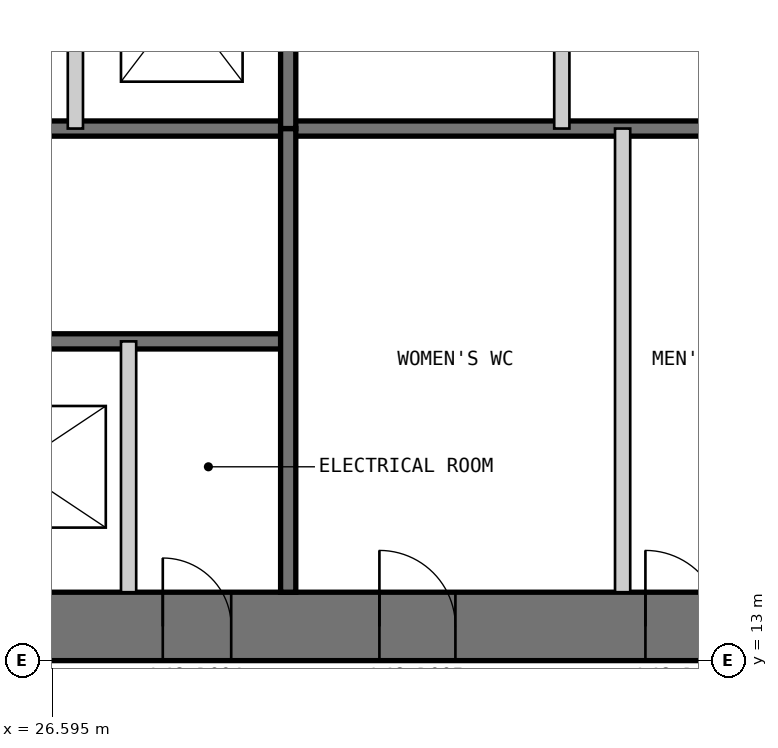
"""IFC4 building model, lengths in metres.
Left out: names, types, materials, properties, quantities, classifications, styles, units other than length and angle.
Written with IfcOpenShell. Run it as: python <this file> out.ifc"""

import sys

from ifc_helpers import new_model, si_unit, direction, frame, frame_2d, origin, place, context, subcontext, project, spatial, polyline, rectangle, outline, extrude, element, fill, save


model = new_model("IFC4")
c1 = context("Model", 3, precision=1e-05, world=origin(), true_north=direction((0.0, 1.0)))
c2 = subcontext(c1, "Body", "Model", "MODEL_VIEW")
j1 = project(units=[si_unit("LENGTHUNIT", "METRE"), si_unit("PLANEANGLEUNIT", "RADIAN")], contexts=[c1])
p1 = place(None, origin())
s1 = spatial("IfcSite", under=j1, at=p1, CompositionType="ELEMENT")
p2 = place(p1, origin())
s2 = spatial("IfcBuilding", under=s1, at=p2, CompositionType="ELEMENT")
p3 = place(p2, frame((0.0, 0.0, 205.8)))
s3 = spatial("IfcBuildingStorey", under=s2, at=p3, CompositionType="ELEMENT", Elevation=205.8)
p4 = place(p3, frame((13.0, 13.45, 0.0), z_axis=(0.0, 0.0, 1.0), x_axis=(1.0, 0.0, 0.0)))
e1 = element("IfcWall", 1, at=p4, inside=s3, PredefinedType="SHEAR", context=c2, shape_type="SweptSolid", body=[
    extrude(outline(polyline([(0.0, -0.45), (24.0, -0.45), (23.1, 0.45), (0.9, 0.45), (0.0, -0.45)])), origin(), (0.0, 0.0, 1.0), 4.0),
])
p5 = place(p4, frame((4.9, 0.0, 0.0)))
e2 = element("IfcOpeningElement", 2, at=p5, cuts=e1, PredefinedType="OPENING", context=c2, shape_type="SweptSolid", body=[
    extrude(rectangle(XDim=1.0, YDim=2.2, at=frame_2d((0.5, 1.1))), frame((0.0, 0.46, 0.0), z_axis=(0.0, -1.0, 0.0), x_axis=(1.0, 0.0, 0.0)), (0.0, 0.0, 1.0), 0.92),
])
p6 = place(p4, frame((8.9, 0.0, 0.0)))
e3 = element("IfcOpeningElement", 3, at=p6, cuts=e1, PredefinedType="OPENING", context=c2, shape_type="SweptSolid", body=[
    extrude(rectangle(XDim=1.1, YDim=2.2, at=frame_2d((0.55, 1.1))), frame((0.0, 0.46, 0.0), z_axis=(0.0, -1.0, 0.0), x_axis=(1.0, 0.0, 0.0)), (0.0, 0.0, 1.0), 0.92),
])
p7 = place(p4, frame((15.05, 0.0, 0.0)))
e4 = element("IfcOpeningElement", 4, at=p7, cuts=e1, PredefinedType="OPENING", context=c2, shape_type="SweptSolid", body=[
    extrude(rectangle(XDim=0.9, YDim=2.2, at=frame_2d((0.45, 1.1))), frame((0.0, 0.46, 0.0), z_axis=(0.0, -1.0, 0.0), x_axis=(1.0, 0.0, 0.0)), (0.0, 0.0, 1.0), 0.92),
])
p8 = place(p4, frame((17.9, 0.0, 0.0)))
e5 = element("IfcOpeningElement", 5, at=p8, cuts=e1, PredefinedType="OPENING", context=c2, shape_type="SweptSolid", body=[
    extrude(rectangle(XDim=1.0, YDim=2.2, at=frame_2d((0.5, 1.1))), frame((0.0, 0.46, 0.0), z_axis=(0.0, -1.0, 0.0), x_axis=(1.0, 0.0, 0.0)), (0.0, 0.0, 1.0), 0.92),
])
p9 = place(p4, frame((21.4, 0.0, 0.0)))
e6 = element("IfcOpeningElement", 6, at=p9, cuts=e1, PredefinedType="OPENING", context=c2, shape_type="SweptSolid", body=[
    extrude(rectangle(XDim=1.0, YDim=2.2, at=frame_2d((0.5, 1.1))), frame((0.0, 0.46, 0.0), z_axis=(0.0, -1.0, 0.0), x_axis=(1.0, 0.0, 0.0)), (0.0, 0.0, 1.0), 0.92),
])
p10 = place(p3, frame((20.3, 17.2, 0.0), z_axis=(0.0, 0.0, 1.0), x_axis=(1.0, 0.0, 0.0)))
e7 = element("IfcWall", 7, at=p10, inside=s3, PredefinedType="SOLIDWALL", context=c2, shape_type="SweptSolid", body=[
    extrude(rectangle(XDim=9.4, YDim=0.2, at=frame_2d((4.7, 0.0))), origin(), (0.0, 0.0, 1.0), 3.8),
])
p11 = place(p10, frame((0.25, 0.0, 0.0)))
e8 = element("IfcOpeningElement", 8, at=p11, cuts=e7, PredefinedType="OPENING", context=c2, shape_type="SweptSolid", body=[
    extrude(rectangle(XDim=1.0, YDim=2.2, at=frame_2d((0.5, 1.1))), frame((0.0, 0.11, 0.0), z_axis=(0.0, -1.0, 0.0), x_axis=(1.0, 0.0, 0.0)), (0.0, 0.0, 1.0), 0.22),
])
p12 = place(p3, frame((20.3, 20.0, 0.0), z_axis=(0.0, 0.0, 1.0), x_axis=(1.0, 0.0, 0.0)))
e9 = element("IfcWall", 9, at=p12, inside=s3, PredefinedType="SOLIDWALL", context=c2, shape_type="SweptSolid", body=[
    extrude(rectangle(XDim=15.8, YDim=0.2, at=frame_2d((7.9, 0.0))), origin(), (0.0, 0.0, 1.0), 3.8),
])
p13 = place(p3, frame((27.6, 13.9, 0.0), z_axis=(0.0, 0.0, 1.0), x_axis=(0.0, 1.0, 0.0)))
e10 = element("IfcWall", 10, at=p13, inside=s3, PredefinedType="PARTITIONING", context=c2, shape_type="SweptSolid", body=[
    extrude(rectangle(XDim=3.3, YDim=0.2, at=frame_2d((1.65, 0.0))), origin(), (0.0, 0.0, 1.0), 3.8),
])
p14 = place(p3, frame((29.7, 13.9, 0.0), z_axis=(0.0, 0.0, 1.0), x_axis=(0.0, 1.0, 0.0)))
e11 = element("IfcWall", 11, at=p14, inside=s3, PredefinedType="SOLIDWALL", context=c2, shape_type="SweptSolid", body=[
    extrude(rectangle(XDim=6.1, YDim=0.2, at=frame_2d((3.05, 0.0))), origin(), (0.0, 0.0, 1.0), 3.8),
])
p15 = place(p3, frame((34.1, 13.9, 0.0), z_axis=(0.0, 0.0, 1.0), x_axis=(0.0, 1.0, 0.0)))
e12 = element("IfcWall", 12, at=p15, inside=s3, PredefinedType="PARTITIONING", context=c2, shape_type="SweptSolid", body=[
    extrude(rectangle(XDim=6.1, YDim=0.2, at=frame_2d((3.05, 0.0))), origin(), (0.0, 0.0, 1.0), 3.8),
])
p16 = place(p3, frame((33.3, 36.1, 0.0), z_axis=(0.0, 0.0, 1.0), x_axis=(0.0, -1.0, 0.0)))
e13 = element("IfcWall", 13, at=p16, inside=s3, PredefinedType="PARTITIONING", context=c2, shape_type="SweptSolid", body=[
    extrude(rectangle(XDim=16.1, YDim=0.2, at=frame_2d((8.05, 0.0))), origin(), (0.0, 0.0, 1.0), 3.8),
])
p17 = place(p16, frame((4.4, 0.0, 0.0)))
e14 = element("IfcOpeningElement", 14, at=p17, cuts=e13, PredefinedType="OPENING", context=c2, shape_type="SweptSolid", body=[
    extrude(rectangle(XDim=0.9, YDim=2.2, at=frame_2d((0.45, 1.1))), frame((0.0, 0.11, 0.0), z_axis=(0.0, -1.0, 0.0), x_axis=(1.0, 0.0, 0.0)), (0.0, 0.0, 1.0), 0.22),
])
p18 = place(p3, frame((29.7, 36.1, 0.0), z_axis=(0.0, 0.0, 1.0), x_axis=(0.0, -1.0, 0.0)))
e15 = element("IfcWall", 15, at=p18, inside=s3, PredefinedType="SOLIDWALL", context=c2, shape_type="SweptSolid", body=[
    extrude(rectangle(XDim=16.1, YDim=0.2, at=frame_2d((8.05, 0.0))), origin(), (0.0, 0.0, 1.0), 3.8),
])
p19 = place(p18, frame((7.217, 0.0, 0.0)))
e16 = element("IfcOpeningElement", 16, at=p19, cuts=e15, PredefinedType="OPENING", context=c2, shape_type="SweptSolid", body=[
    extrude(rectangle(XDim=1.1, YDim=2.2, at=frame_2d((0.55, 1.1))), frame((0.0, 0.11, 0.0), z_axis=(0.0, -1.0, 0.0), x_axis=(1.0, 0.0, 0.0)), (0.0, 0.0, 1.0), 0.22),
])
p20 = place(p18, frame((10.55, 0.0, 0.0)))
e17 = element("IfcOpeningElement", 17, at=p20, cuts=e15, PredefinedType="OPENING", context=c2, shape_type="SweptSolid", body=[
    extrude(rectangle(XDim=1.1, YDim=2.2, at=frame_2d((0.55, 1.1))), frame((0.0, 0.11, 0.0), z_axis=(0.0, -1.0, 0.0), x_axis=(1.0, 0.0, 0.0)), (0.0, 0.0, 1.0), 0.22),
])
p21 = place(p18, frame((13.883, 0.0, 0.0)))
e18 = element("IfcOpeningElement", 18, at=p21, cuts=e15, PredefinedType="OPENING", context=c2, shape_type="SweptSolid", body=[
    extrude(rectangle(XDim=1.1, YDim=2.2, at=frame_2d((0.55, 1.1))), frame((0.0, 0.11, 0.0), z_axis=(0.0, -1.0, 0.0), x_axis=(1.0, 0.0, 0.0)), (0.0, 0.0, 1.0), 0.22),
])
p22 = place(p3, frame((26.9, 30.0, 0.0), z_axis=(0.0, 0.0, 1.0), x_axis=(0.0, -1.0, 0.0)))
e19 = element("IfcWall", 19, at=p22, inside=s3, PredefinedType="PARTITIONING", context=c2, shape_type="SweptSolid", body=[
    extrude(rectangle(XDim=10.0, YDim=0.2, at=frame_2d((5.0, 0.0))), origin(), (0.0, 0.0, 1.0), 3.8),
])
p23 = place(p7, origin())
e20 = element("IfcDoor", 20, at=p23, inside=s3, OperationType="SINGLE_SWING_LEFT", PredefinedType="DOOR", context=c2, shape_type="SweptSolid", body=[
    extrude(rectangle(XDim=0.9, YDim=2.2, at=frame_2d((0.45, 1.1))), frame((0.0, 0.025, 0.0), z_axis=(0.0, -1.0, 0.0), x_axis=(1.0, 0.0, 0.0)), (0.0, 0.0, 1.0), 0.05),
    extrude(outline(polyline([(0.0, 0.0), (0.04, 0.0), (0.04, 2.16), (0.86, 2.16), (0.86, 0.0), (0.9, 0.0), (0.9, 2.2), (0.0, 2.2), (0.0, 0.0)])), frame((0.0, 0.3, 0.0), z_axis=(0.0, -1.0, 0.0), x_axis=(1.0, 0.0, 0.0)), (0.0, 0.0, 1.0), 0.6),
])
fill(e4, e20)
p24 = place(p8, origin())
e21 = element("IfcDoor", 21, at=p24, inside=s3, OperationType="SINGLE_SWING_LEFT", PredefinedType="DOOR", context=c2, shape_type="SweptSolid", body=[
    extrude(rectangle(XDim=1.0, YDim=2.2, at=frame_2d((0.5, 1.1))), frame((0.0, 0.025, 0.0), z_axis=(0.0, -1.0, 0.0), x_axis=(1.0, 0.0, 0.0)), (0.0, 0.0, 1.0), 0.05),
    extrude(outline(polyline([(0.0, 0.0), (0.04, 0.0), (0.04, 2.16), (0.96, 2.16), (0.96, 0.0), (1.0, 0.0), (1.0, 2.2), (0.0, 2.2), (0.0, 0.0)])), frame((0.0, 0.3, 0.0), z_axis=(0.0, -1.0, 0.0), x_axis=(1.0, 0.0, 0.0)), (0.0, 0.0, 1.0), 0.6),
])
fill(e5, e21)
p25 = place(p9, origin())
e22 = element("IfcDoor", 22, at=p25, inside=s3, OperationType="SINGLE_SWING_LEFT", PredefinedType="DOOR", context=c2, shape_type="SweptSolid", body=[
    extrude(rectangle(XDim=1.0, YDim=2.2, at=frame_2d((0.5, 1.1))), frame((0.0, 0.025, 0.0), z_axis=(0.0, -1.0, 0.0), x_axis=(1.0, 0.0, 0.0)), (0.0, 0.0, 1.0), 0.05),
    extrude(outline(polyline([(0.0, 0.0), (0.04, 0.0), (0.04, 2.16), (0.96, 2.16), (0.96, 0.0), (1.0, 0.0), (1.0, 2.2), (0.0, 2.2), (0.0, 0.0)])), frame((0.0, 0.3, 0.0), z_axis=(0.0, -1.0, 0.0), x_axis=(1.0, 0.0, 0.0)), (0.0, 0.0, 1.0), 0.6),
])
fill(e6, e22)
save(model, sys.argv[1])
